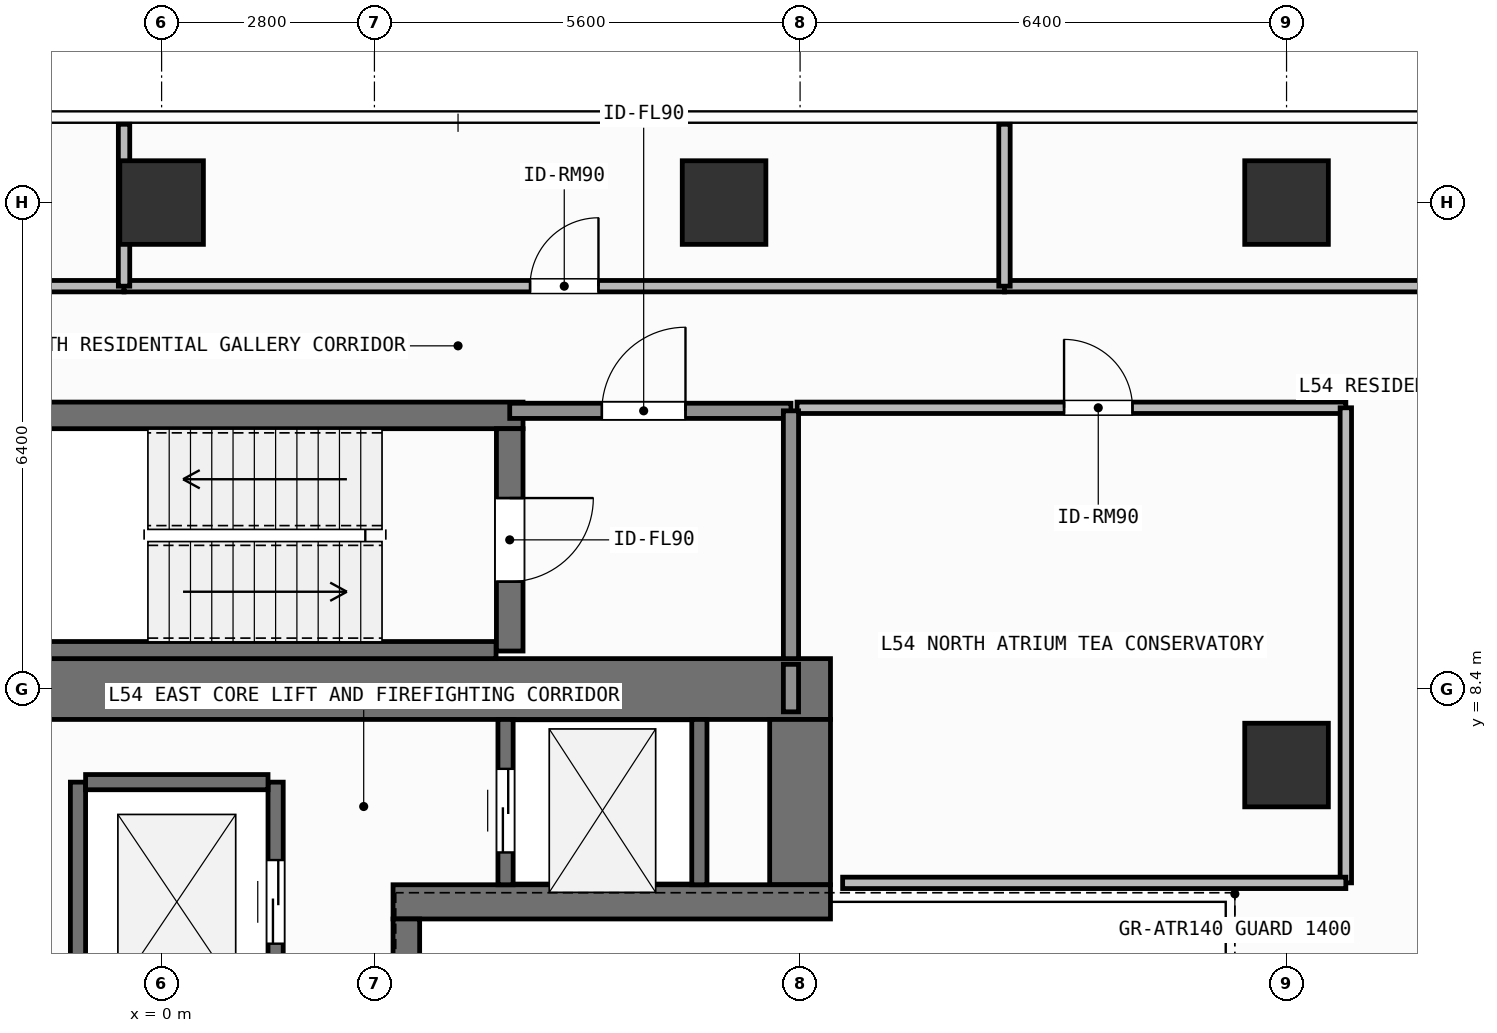
"""IFC4 building model, lengths in metres.
Left out: names, types, materials, properties, quantities, classifications, styles, units other than length and angle.
Written with IfcOpenShell. Run it as: python <this file> out.ifc"""

import sys

from ifc_helpers import new_model, si_unit, direction, frame, frame_2d, origin, origin_2d, place, context, subcontext, project, spatial, rectangle, extrude, element, fill, save


model = new_model("IFC4")
c1 = context("Model", 3, precision=1e-05, world=origin(), true_north=direction((0.0, 1.0)))
c2 = subcontext(c1, "Body", "Model", "MODEL_VIEW")
j1 = project(units=[si_unit("LENGTHUNIT", "METRE"), si_unit("PLANEANGLEUNIT", "RADIAN")], contexts=[c1])
p1 = place(None, origin())
s1 = spatial("IfcSite", under=j1, at=p1, CompositionType="ELEMENT")
p2 = place(p1, origin())
s2 = spatial("IfcBuilding", under=s1, at=p2, CompositionType="ELEMENT")
p3 = place(p2, frame((0.0, 0.0, 219.6)))
s3 = spatial("IfcBuildingStorey", under=s2, at=p3, CompositionType="ELEMENT", Elevation=219.6)
p4 = place(p3, frame((-7.55, 8.4, 0.0), z_axis=(0.0, 0.0, 1.0), x_axis=(1.0, 0.0, 0.0)))
e1 = element("IfcWall", 1, at=p4, inside=s3, PredefinedType="SHEAR", context=c2, shape_type="SweptSolid", body=[
    extrude(rectangle(XDim=16.35, YDim=0.8, at=frame_2d((8.175, 0.0))), origin(), (0.0, 0.0, 1.0), 3.9),
])
p5 = place(p3, frame((8.4, 5.825, 0.0), z_axis=(0.0, 0.0, 1.0), x_axis=(0.0, 1.0, 0.0)))
e2 = element("IfcWall", 2, at=p5, inside=s3, PredefinedType="SHEAR", context=c2, shape_type="SweptSolid", body=[
    extrude(rectangle(XDim=2.175, YDim=0.8, at=frame_2d((1.087, 0.0))), origin(), (0.0, 0.0, 1.0), 3.9),
])
p6 = place(p3, frame((3.045, 5.6, 0.0), z_axis=(0.0, 0.0, 1.0), x_axis=(1.0, 0.0, 0.0)))
e3 = element("IfcWall", 3, at=p6, inside=s3, PredefinedType="SHEAR", context=c2, shape_type="SweptSolid", body=[
    extrude(rectangle(XDim=5.755, YDim=0.45, at=frame_2d((2.877, 0.0))), origin(), (0.0, 0.0, 1.0), 3.9),
])
p7 = place(p3, frame((3.22, -5.375, 0.0), z_axis=(0.0, 0.0, 1.0), x_axis=(0.0, 1.0, 0.0)))
e4 = element("IfcWall", 4, at=p7, inside=s3, PredefinedType="SHEAR", context=c2, shape_type="SweptSolid", body=[
    extrude(rectangle(XDim=10.75, YDim=0.35, at=frame_2d((5.375, 0.0))), origin(), (0.0, 0.0, 1.0), 3.9),
])
p8 = place(p3, frame((-2.555, 12.0, 0.0), z_axis=(0.0, 0.0, 1.0), x_axis=(1.0, 0.0, 0.0)))
e5 = element("IfcWall", 5, at=p8, inside=s3, PredefinedType="SHEAR", context=c2, shape_type="SweptSolid", body=[
    extrude(rectangle(XDim=7.31, YDim=0.35, at=frame_2d((3.655, 0.0))), origin(), (0.0, 0.0, 1.0), 3.9),
])
p9 = place(p3, frame((-2.2, 8.913, 0.0), z_axis=(0.0, 0.0, 1.0), x_axis=(1.0, 0.0, 0.0)))
e6 = element("IfcWall", 6, at=p9, inside=s3, PredefinedType="SHEAR", context=c2, shape_type="SweptSolid", body=[
    extrude(rectangle(XDim=6.6, YDim=0.225, at=frame_2d((3.3, 0.0))), origin(), (0.0, 0.0, 1.0), 3.9),
])
p10 = place(p3, frame((4.58, 11.825, 0.0), z_axis=(0.0, 0.0, 1.0), x_axis=(0.0, -1.0, 0.0)))
e7 = element("IfcWall", 7, at=p10, inside=s3, PredefinedType="SHEAR", context=c2, shape_type="SweptSolid", body=[
    extrude(rectangle(XDim=2.925, YDim=0.35, at=frame_2d((1.462, 0.0))), origin(), (0.0, 0.0, 1.0), 3.9),
])
p11 = place(p10, frame((0.913, 0.0, 0.0)))
e8 = element("IfcOpeningElement", 8, at=p11, cuts=e7, PredefinedType="OPENING", context=c2, shape_type="SweptSolid", body=[
    extrude(rectangle(XDim=1.1, YDim=2.15, at=frame_2d((0.55, 1.075))), frame((0.0, 0.185, 0.0), z_axis=(0.0, -1.0, 0.0), x_axis=(1.0, 0.0, 0.0)), (0.0, 0.0, 1.0), 0.37),
])
for number, where, z_axis, x_axis in (
    (9, (0.0, 14.8, 0.0), (0.0, 0.0, 1.0), (1.0, 0.0, 0.0)),
    (10, (7.4, 14.8, 0.0), (0.0, 0.0, 1.0), (1.0, 0.0, 0.0)),
    (11, (14.8, 14.8, 0.0), (0.0, 0.0, 1.0), (1.0, 0.0, 0.0)),
    (12, (14.8, 7.4, 0.0), (0.0, 0.0, 1.0), (1.0, 0.0, 0.0)),
):
    element("IfcColumn", number, at=place(p3, frame(where, z_axis=z_axis, x_axis=x_axis)), inside=s3, PredefinedType="COLUMN", context=c2, shape_type="SweptSolid", body=[
        extrude(rectangle(XDim=1.1, YDim=1.1, at=origin_2d()), origin(), (0.0, 0.0, 1.0), 3.9),
    ])
p12 = place(p3, frame((-1.1, 4.025, 0.0), z_axis=(0.0, 0.0, 1.0), x_axis=(0.0, 1.0, 0.0)))
e13 = element("IfcWall", 13, at=p12, inside=s3, PredefinedType="SHEAR", context=c2, shape_type="SweptSolid", body=[
    extrude(rectangle(XDim=3.15, YDim=0.2, at=frame_2d((1.575, 0.0))), origin(), (0.0, 0.0, 1.0), 3.68),
])
p13 = place(p3, frame((1.5, 4.025, 0.0), z_axis=(0.0, 0.0, 1.0), x_axis=(0.0, 1.0, 0.0)))
e14 = element("IfcWall", 14, at=p13, inside=s3, PredefinedType="SHEAR", context=c2, shape_type="SweptSolid", body=[
    extrude(rectangle(XDim=3.15, YDim=0.2, at=frame_2d((1.575, 0.0))), origin(), (0.0, 0.0, 1.0), 3.68),
])
p14 = place(p13, frame((1.025, 0.0, 0.0)))
e15 = element("IfcOpeningElement", 15, at=p14, cuts=e14, PredefinedType="OPENING", context=c2, shape_type="SweptSolid", body=[
    extrude(rectangle(XDim=1.1, YDim=2.2, at=frame_2d((0.55, 1.1))), frame((0.0, 0.11, 0.0), z_axis=(0.0, -1.0, 0.0), x_axis=(1.0, 0.0, 0.0)), (0.0, 0.0, 1.0), 0.22),
])
p15 = place(p3, frame((-1.0, 7.175, 0.0), z_axis=(0.0, 0.0, 1.0), x_axis=(1.0, 0.0, 0.0)))
e16 = element("IfcWall", 16, at=p15, inside=s3, PredefinedType="SHEAR", context=c2, shape_type="SweptSolid", body=[
    extrude(rectangle(XDim=2.4, YDim=0.2, at=frame_2d((1.2, 0.0))), origin(), (0.0, 0.0, 1.0), 3.68),
])
p16 = place(p3, frame((4.525, 5.825, 0.0), z_axis=(0.0, 0.0, 1.0), x_axis=(0.0, 1.0, 0.0)))
e17 = element("IfcWall", 17, at=p16, inside=s3, PredefinedType="SHEAR", context=c2, shape_type="SweptSolid", body=[
    extrude(rectangle(XDim=2.175, YDim=0.2, at=frame_2d((1.087, 0.0))), origin(), (0.0, 0.0, 1.0), 3.68),
])
p17 = place(p16, frame((0.425, 0.0, 0.0)))
e18 = element("IfcOpeningElement", 18, at=p17, cuts=e17, PredefinedType="OPENING", context=c2, shape_type="SweptSolid", body=[
    extrude(rectangle(XDim=1.1, YDim=2.2, at=frame_2d((0.55, 1.1))), frame((0.0, 0.11, 0.0), z_axis=(0.0, -1.0, 0.0), x_axis=(1.0, 0.0, 0.0)), (0.0, 0.0, 1.0), 0.22),
])
p18 = place(p3, frame((7.075, 5.825, 0.0), z_axis=(0.0, 0.0, 1.0), x_axis=(0.0, 1.0, 0.0)))
e19 = element("IfcWall", 19, at=p18, inside=s3, PredefinedType="SHEAR", context=c2, shape_type="SweptSolid", body=[
    extrude(rectangle(XDim=2.175, YDim=0.2, at=frame_2d((1.087, 0.0))), origin(), (0.0, 0.0, 1.0), 3.68),
])
p19 = place(p3, frame((4.58, 12.06, 0.0), z_axis=(0.0, 0.0, 1.0), x_axis=(1.0, 0.0, 0.0)))
e20 = element("IfcWall", 20, at=p19, inside=s3, PredefinedType="SOLIDWALL", context=c2, shape_type="SweptSolid", body=[
    extrude(rectangle(XDim=3.7, YDim=0.2, at=frame_2d((1.85, 0.0))), origin(), (0.0, 0.0, 1.0), 3.68),
])
p20 = place(p19, frame((1.212, 0.0, 0.0)))
e21 = element("IfcOpeningElement", 21, at=p20, cuts=e20, PredefinedType="OPENING", context=c2, shape_type="SweptSolid", body=[
    extrude(rectangle(XDim=1.1, YDim=2.15, at=frame_2d((0.55, 1.075))), frame((0.0, 0.11, 0.0), z_axis=(0.0, -1.0, 0.0), x_axis=(1.0, 0.0, 0.0)), (0.0, 0.0, 1.0), 0.22),
])
p21 = place(p3, frame((8.36, 12.1, 0.0), z_axis=(0.0, 0.0, 1.0), x_axis=(1.0, 0.0, 0.0)))
e22 = element("IfcWall", 22, at=p21, inside=s3, PredefinedType="PARTITIONING", context=c2, shape_type="SweptSolid", body=[
    extrude(rectangle(XDim=7.22, YDim=0.15, at=frame_2d((3.61, 0.0))), origin(), (0.0, 0.0, 1.0), 3.68),
])
p22 = place(p21, frame((3.513, 0.0, 0.0)))
e23 = element("IfcOpeningElement", 23, at=p22, cuts=e22, PredefinedType="OPENING", context=c2, shape_type="SweptSolid", body=[
    extrude(rectangle(XDim=0.9, YDim=2.1, at=frame_2d((0.45, 1.05))), frame((0.0, 0.085, 0.0), z_axis=(0.0, -1.0, 0.0), x_axis=(1.0, 0.0, 0.0)), (0.0, 0.0, 1.0), 0.17),
])
p23 = place(p3, frame((-9.68, 13.7, 0.0), z_axis=(0.0, 0.0, 1.0), x_axis=(1.0, 0.0, 0.0)))
e24 = element("IfcWall", 24, at=p23, inside=s3, PredefinedType="PARTITIONING", context=c2, shape_type="SweptSolid", body=[
    extrude(rectangle(XDim=9.186, YDim=0.15, at=frame_2d((4.593, 0.0))), origin(), (0.0, 0.0, 1.0), 3.68),
])
p24 = place(p23, frame((4.231, 0.0, 0.0)))
e25 = element("IfcOpeningElement", 25, at=p24, cuts=e24, PredefinedType="OPENING", context=c2, shape_type="SweptSolid", body=[
    extrude(rectangle(XDim=0.9, YDim=2.1, at=frame_2d((0.45, 1.05))), frame((0.0, 0.085, 0.0), z_axis=(0.0, -1.0, 0.0), x_axis=(1.0, 0.0, 0.0)), (0.0, 0.0, 1.0), 0.17),
])
p25 = place(p3, frame((-0.494, 13.7, 0.0), z_axis=(0.0, 0.0, 1.0), x_axis=(1.0, 0.0, 0.0)))
e26 = element("IfcWall", 26, at=p25, inside=s3, PredefinedType="PARTITIONING", context=c2, shape_type="SweptSolid", body=[
    extrude(rectangle(XDim=11.583, YDim=0.15, at=frame_2d((5.792, 0.0))), origin(), (0.0, 0.0, 1.0), 3.68),
])
p26 = place(p25, frame((5.342, 0.0, 0.0)))
e27 = element("IfcOpeningElement", 27, at=p26, cuts=e26, PredefinedType="OPENING", context=c2, shape_type="SweptSolid", body=[
    extrude(rectangle(XDim=0.9, YDim=2.1, at=frame_2d((0.45, 1.05))), frame((0.0, 0.085, 0.0), z_axis=(0.0, -1.0, 0.0), x_axis=(1.0, 0.0, 0.0)), (0.0, 0.0, 1.0), 0.17),
])
p27 = place(p3, frame((11.089, 13.7, 0.0), z_axis=(0.0, 0.0, 1.0), x_axis=(1.0, 0.0, 0.0)))
e28 = element("IfcWall", 28, at=p27, inside=s3, PredefinedType="PARTITIONING", context=c2, shape_type="SweptSolid", body=[
    extrude(rectangle(XDim=12.741, YDim=0.15, at=frame_2d((6.371, 0.0))), origin(), (0.0, 0.0, 1.0), 3.68),
])
p28 = place(p27, frame((5.832, 0.0, 0.0)))
e29 = element("IfcOpeningElement", 29, at=p28, cuts=e28, PredefinedType="OPENING", context=c2, shape_type="SweptSolid", body=[
    extrude(rectangle(XDim=0.9, YDim=2.1, at=frame_2d((0.45, 1.05))), frame((0.0, 0.085, 0.0), z_axis=(0.0, -1.0, 0.0), x_axis=(1.0, 0.0, 0.0)), (0.0, 0.0, 1.0), 0.17),
])
p29 = place(p3, frame((8.28, 8.8, 0.0), z_axis=(0.0, 0.0, 1.0), x_axis=(0.0, 1.0, 0.0)))
e30 = element("IfcWall", 30, at=p29, inside=s3, PredefinedType="SOLIDWALL", context=c2, shape_type="SweptSolid", body=[
    extrude(rectangle(XDim=3.26, YDim=0.2, at=frame_2d((1.63, 0.0))), origin(), (0.0, 0.0, 1.0), 3.68),
])
p30 = place(p3, frame((8.28, 8.1, 0.0), z_axis=(0.0, 0.0, 1.0), x_axis=(0.0, 1.0, 0.0)))
e31 = element("IfcWall", 31, at=p30, inside=s3, PredefinedType="SOLIDWALL", context=c2, shape_type="SweptSolid", body=[
    extrude(rectangle(XDim=0.625, YDim=0.2, at=frame_2d((0.312, 0.0))), origin(), (0.0, 0.0, 1.0), 3.68),
])
p31 = place(p3, frame((15.58, 5.85, 0.0), z_axis=(0.0, 0.0, 1.0), x_axis=(0.0, 1.0, 0.0)))
e32 = element("IfcWall", 32, at=p31, inside=s3, PredefinedType="PARTITIONING", context=c2, shape_type="SweptSolid", body=[
    extrude(rectangle(XDim=6.25, YDim=0.15, at=frame_2d((3.125, 0.0))), origin(), (0.0, 0.0, 1.0), 3.68),
])
p32 = place(p3, frame((8.96, 5.85, 0.0), z_axis=(0.0, 0.0, 1.0), x_axis=(1.0, 0.0, 0.0)))
e33 = element("IfcWall", 33, at=p32, inside=s3, PredefinedType="PARTITIONING", context=c2, shape_type="SweptSolid", body=[
    extrude(rectangle(XDim=6.62, YDim=0.15, at=frame_2d((3.31, 0.0))), origin(), (0.0, 0.0, 1.0), 3.68),
])
for number, where, z_axis, x_axis in (
    (34, (-0.494, 13.7, 0.0), (0.0, 0.0, 1.0), (0.0, 1.0, 0.0)),
    (35, (11.089, 13.7, 0.0), (0.0, 0.0, 1.0), (0.0, 1.0, 0.0)),
):
    element("IfcWall", number, at=place(p3, frame(where, z_axis=z_axis, x_axis=x_axis)), inside=s3, PredefinedType="PARTITIONING", context=c2, shape_type="SweptSolid", body=[
        extrude(rectangle(XDim=2.13, YDim=0.15, at=frame_2d((1.065, 0.0))), origin(), (0.0, 0.0, 1.0), 3.68),
    ])
p33 = place(p14, origin())
e36 = element("IfcDoor", 36, at=p33, inside=s3, OperationType="SLIDING_TO_LEFT", PredefinedType="DOOR", context=c2, shape_type="SweptSolid", body=[
    extrude(rectangle(XDim=1.1, YDim=2.2, at=frame_2d((0.55, 1.1))), frame((0.0, 0.025, 0.0), z_axis=(0.0, -1.0, 0.0), x_axis=(1.0, 0.0, 0.0)), (0.0, 0.0, 1.0), 0.05),
])
fill(e15, e36)
p34 = place(p17, origin())
e37 = element("IfcDoor", 37, at=p34, inside=s3, OperationType="SLIDING_TO_LEFT", PredefinedType="DOOR", context=c2, shape_type="SweptSolid", body=[
    extrude(rectangle(XDim=1.1, YDim=2.2, at=frame_2d((0.55, 1.1))), frame((0.0, 0.025, 0.0), z_axis=(0.0, -1.0, 0.0), x_axis=(1.0, 0.0, 0.0)), (0.0, 0.0, 1.0), 0.05),
])
fill(e18, e37)
p35 = place(p11, origin())
e38 = element("IfcDoor", 38, at=p35, inside=s3, OperationType="SINGLE_SWING_LEFT", PredefinedType="DOOR", context=c2, shape_type="SweptSolid", body=[
    extrude(rectangle(XDim=1.1, YDim=2.15, at=frame_2d((0.55, 1.075))), frame((0.0, 0.025, 0.0), z_axis=(0.0, -1.0, 0.0), x_axis=(1.0, 0.0, 0.0)), (0.0, 0.0, 1.0), 0.05),
])
fill(e8, e38)
p36 = place(p20, origin())
e39 = element("IfcDoor", 39, at=p36, inside=s3, OperationType="SINGLE_SWING_RIGHT", PredefinedType="DOOR", context=c2, shape_type="SweptSolid", body=[
    extrude(rectangle(XDim=1.1, YDim=2.15, at=frame_2d((0.55, 1.075))), frame((0.0, 0.025, 0.0), z_axis=(0.0, -1.0, 0.0), x_axis=(1.0, 0.0, 0.0)), (0.0, 0.0, 1.0), 0.05),
])
fill(e21, e39)
p37 = place(p22, origin())
e40 = element("IfcDoor", 40, at=p37, inside=s3, OperationType="SINGLE_SWING_LEFT", PredefinedType="DOOR", context=c2, shape_type="SweptSolid", body=[
    extrude(rectangle(XDim=0.9, YDim=2.1, at=frame_2d((0.45, 1.05))), frame((0.0, 0.025, 0.0), z_axis=(0.0, -1.0, 0.0), x_axis=(1.0, 0.0, 0.0)), (0.0, 0.0, 1.0), 0.05),
])
fill(e23, e40)
p38 = place(p26, origin())
e41 = element("IfcDoor", 41, at=p38, inside=s3, OperationType="SINGLE_SWING_RIGHT", PredefinedType="DOOR", context=c2, shape_type="SweptSolid", body=[
    extrude(rectangle(XDim=0.9, YDim=2.1, at=frame_2d((0.45, 1.05))), frame((0.0, 0.025, 0.0), z_axis=(0.0, -1.0, 0.0), x_axis=(1.0, 0.0, 0.0)), (0.0, 0.0, 1.0), 0.05),
])
fill(e27, e41)
save(model, sys.argv[1])
